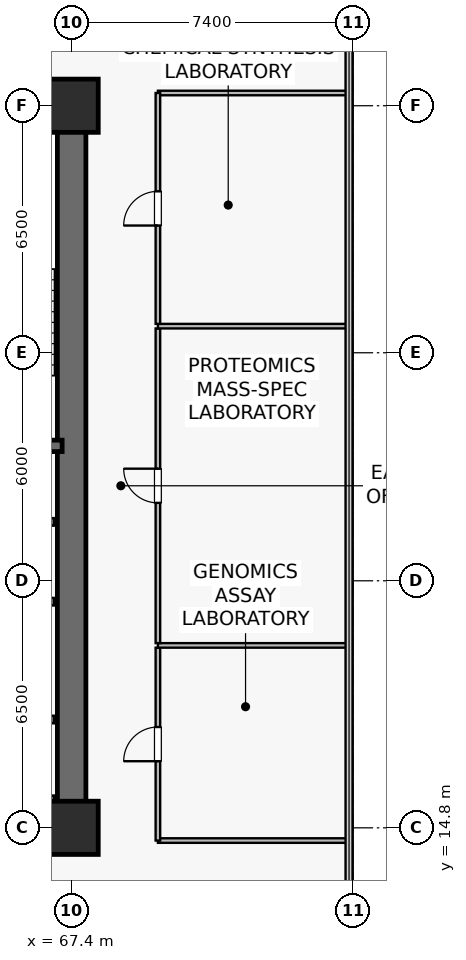
"""IFC4 building model, lengths in metres.
Left out: names, types, materials, properties, quantities, classifications, styles, units other than length and angle.
Written with IfcOpenShell. Run it as: python <this file> out.ifc"""

import sys

from ifc_helpers import new_model, si_unit, direction, frame, frame_2d, origin, origin_2d, place, context, subcontext, project, spatial, rectangle, extrude, source, transform, mapped, element, fill, save


model = new_model("IFC4")
c1 = context("Model", 3, precision=1e-05, world=origin(), true_north=direction((0.0, 1.0)))
c2 = subcontext(c1, "Body", "Model", "MODEL_VIEW")
j1 = project(units=[si_unit("LENGTHUNIT", "METRE"), si_unit("PLANEANGLEUNIT", "RADIAN")], contexts=[c1])
p1 = place(None, origin())
s1 = spatial("IfcSite", under=j1, at=p1, CompositionType="ELEMENT")
p2 = place(p1, origin())
s2 = spatial("IfcBuilding", under=s1, at=p2, CompositionType="ELEMENT")
p3 = place(p2, frame((0.0, 0.0, 41.6)))
s3 = spatial("IfcBuildingStorey", under=s2, at=p3, CompositionType="ELEMENT", Elevation=41.6)
p4 = place(p3, frame((52.225, 14.8, 0.0), z_axis=(0.0, 0.0, 1.0), x_axis=(1.0, 0.0, 0.0)))
e1 = element("IfcWall", 1, at=p4, inside=s3, PredefinedType="SHEAR", context=c2, shape_type="SweptSolid", body=[
    extrude(rectangle(XDim=15.55, YDim=0.75, at=frame_2d((7.775, 0.0))), origin(), (0.0, 0.0, 1.0), 3.78),
])
p5 = place(p3, frame((52.225, 33.8, 0.0), z_axis=(0.0, 0.0, 1.0), x_axis=(1.0, 0.0, 0.0)))
e2 = element("IfcWall", 2, at=p5, inside=s3, PredefinedType="SHEAR", context=c2, shape_type="SweptSolid", body=[
    extrude(rectangle(XDim=15.55, YDim=0.75, at=frame_2d((7.775, 0.0))), origin(), (0.0, 0.0, 1.0), 3.78),
])
p6 = place(p5, frame((7.725, 0.0, 0.0)))
e3 = element("IfcOpeningElement", 3, at=p6, cuts=e2, PredefinedType="OPENING", context=c2, shape_type="SweptSolid", body=[
    extrude(rectangle(XDim=0.95, YDim=2.15, at=frame_2d((0.475, 1.075))), frame((0.0, 0.385, 0.0), z_axis=(0.0, -1.0, 0.0), x_axis=(1.0, 0.0, 0.0)), (0.0, 0.0, 1.0), 0.77),
])
p7 = place(p5, frame((2.66, 0.0, 0.0)))
e4 = element("IfcOpeningElement", 4, at=p7, cuts=e2, PredefinedType="OPENING", context=c2, shape_type="SweptSolid", body=[
    extrude(rectangle(XDim=0.95, YDim=2.15, at=frame_2d((0.475, 1.075))), frame((0.0, 0.385, 0.0), z_axis=(0.0, -1.0, 0.0), x_axis=(1.0, 0.0, 0.0)), (0.0, 0.0, 1.0), 0.77),
])
p8 = place(p3, frame((67.4, 15.175, 0.0), z_axis=(0.0, 0.0, 1.0), x_axis=(0.0, 1.0, 0.0)))
e5 = element("IfcWall", 5, at=p8, inside=s3, PredefinedType="SHEAR", context=c2, shape_type="SweptSolid", body=[
    extrude(rectangle(XDim=18.25, YDim=0.75, at=frame_2d((9.125, 0.0))), origin(), (0.0, 0.0, 1.0), 3.78),
])
p9 = place(p3, frame((63.35, 24.85, 0.0), z_axis=(0.0, 0.0, 1.0), x_axis=(1.0, 0.0, 0.0)))
e6 = element("IfcWall", 6, at=p9, inside=s3, PredefinedType="SHEAR", context=c2, shape_type="SweptSolid", body=[
    extrude(rectangle(XDim=3.8, YDim=0.3, at=frame_2d((1.9, 0.0))), origin(), (0.0, 0.0, 1.0), 3.78),
])
p10 = place(p3, frame((63.35, 33.4, 0.0), z_axis=(0.0, 0.0, 1.0), x_axis=(1.0, 0.0, 0.0)))
e7 = element("IfcWall", 7, at=p10, inside=s3, PredefinedType="SOLIDWALL", context=c2, shape_type="SweptSolid", body=[
    extrude(rectangle(XDim=3.72, YDim=0.12, at=frame_2d((1.86, 0.0))), origin(), (0.0, 0.0, 1.0), 3.78),
])
m1 = source(origin(), c2, "Body", "SweptSolid", [
    extrude(rectangle(XDim=1.4, YDim=1.4, at=origin_2d()), origin(), (0.0, 0.0, 1.0), 4.1),
])
for number, where, z_axis, x_axis in (
    (8, (67.4, 14.8, 0.0), (0.0, 0.0, 1.0), (1.0, 0.0, 0.0)),
    (9, (67.4, 33.8, 0.0), (0.0, 0.0, 1.0), (1.0, 0.0, 0.0)),
):
    element("IfcColumn", number, at=place(p3, frame(where, z_axis=z_axis, x_axis=x_axis)), inside=s3, PredefinedType="COLUMN", context=c2, shape_type="MappedRepresentation", body=[
        mapped(m1, transform((0.0, 0.0, 0.0), scale=1.0)),
    ])
p11 = place(p3, frame((64.67, 17.65, 0.0), z_axis=(0.0, 0.0, 1.0), x_axis=(1.0, 0.0, 0.0)))
e10 = element("IfcWall", 10, at=p11, inside=s3, PredefinedType="SOLIDWALL", context=c2, shape_type="SweptSolid", body=[
    extrude(rectangle(XDim=2.26, YDim=0.2, at=frame_2d((1.13, 0.0))), origin(), (0.0, 0.0, 1.0), 3.78),
])
p12 = place(p11, frame((0.58, 0.0, 0.0)))
e11 = element("IfcOpeningElement", 11, at=p12, cuts=e10, PredefinedType="OPENING", context=c2, shape_type="SweptSolid", body=[
    extrude(rectangle(XDim=1.1, YDim=2.22, at=frame_2d((0.55, 1.11))), frame((0.0, 0.11, 0.0), z_axis=(0.0, -1.0, 0.0), x_axis=(1.0, 0.0, 0.0)), (0.0, 0.0, 1.0), 0.22),
])
for number, where, z_axis, x_axis in (
    (12, (64.67, 15.55, 0.0), (0.0, 0.0, 1.0), (1.0, 0.0, 0.0)),
    (13, (64.67, 20.75, 0.0), (0.0, 0.0, 1.0), (1.0, 0.0, 0.0)),
    (14, (64.67, 22.85, 0.0), (0.0, 0.0, 1.0), (1.0, 0.0, 0.0)),
):
    element("IfcWall", number, at=place(p3, frame(where, z_axis=z_axis, x_axis=x_axis)), inside=s3, PredefinedType="SOLIDWALL", context=c2, shape_type="SweptSolid", body=[
        extrude(rectangle(XDim=2.26, YDim=0.2, at=frame_2d((1.13, 0.0))), origin(), (0.0, 0.0, 1.0), 3.78),
    ])
for number, where, z_axis, x_axis in (
    (15, (69.67, 14.465, 0.0), (0.0, 0.0, 1.0), (1.0, 0.0, 0.0)),
    (16, (69.67, 34.135, 0.0), (0.0, 0.0, 1.0), (1.0, 0.0, 0.0)),
):
    element("IfcWall", number, at=place(p3, frame(where, z_axis=z_axis, x_axis=x_axis)), inside=s3, PredefinedType="PARTITIONING", context=c2, shape_type="SweptSolid", body=[
        extrude(rectangle(XDim=5.02, YDim=0.12, at=frame_2d((2.51, 0.0))), origin(), (0.0, 0.0, 1.0), 3.78),
    ])
p13 = place(p3, frame((69.67, 14.465, 0.0), z_axis=(0.0, 0.0, 1.0), x_axis=(0.0, 1.0, 0.0)))
e17 = element("IfcWall", 17, at=p13, inside=s3, PredefinedType="PARTITIONING", context=c2, shape_type="SweptSolid", body=[
    extrude(rectangle(XDim=5.075, YDim=0.12, at=frame_2d((2.538, 0.0))), origin(), (0.0, 0.0, 1.0), 3.78),
])
p14 = place(p13, frame((2.087, 0.0, 0.0)))
e18 = element("IfcOpeningElement", 18, at=p14, cuts=e17, PredefinedType="OPENING", context=c2, shape_type="SweptSolid", body=[
    extrude(rectangle(XDim=0.9, YDim=2.1, at=frame_2d((0.45, 1.05))), frame((0.0, 0.07, 0.0), z_axis=(0.0, -1.0, 0.0), x_axis=(1.0, 0.0, 0.0)), (0.0, 0.0, 1.0), 0.14),
])
p15 = place(p3, frame((69.67, 19.6, 0.0), z_axis=(0.0, 0.0, 1.0), x_axis=(1.0, 0.0, 0.0)))
e19 = element("IfcWall", 19, at=p15, inside=s3, PredefinedType="PARTITIONING", context=c2, shape_type="SweptSolid", body=[
    extrude(rectangle(XDim=5.02, YDim=0.12, at=frame_2d((2.51, 0.0))), origin(), (0.0, 0.0, 1.0), 3.78),
])
p16 = place(p3, frame((69.67, 19.66, 0.0), z_axis=(0.0, 0.0, 1.0), x_axis=(0.0, 1.0, 0.0)))
e20 = element("IfcWall", 20, at=p16, inside=s3, PredefinedType="PARTITIONING", context=c2, shape_type="SweptSolid", body=[
    extrude(rectangle(XDim=8.28, YDim=0.12, at=frame_2d((4.14, 0.0))), origin(), (0.0, 0.0, 1.0), 3.78),
])
p17 = place(p16, frame((3.69, 0.0, 0.0)))
e21 = element("IfcOpeningElement", 21, at=p17, cuts=e20, PredefinedType="OPENING", context=c2, shape_type="SweptSolid", body=[
    extrude(rectangle(XDim=0.9, YDim=2.1, at=frame_2d((0.45, 1.05))), frame((0.0, 0.07, 0.0), z_axis=(0.0, -1.0, 0.0), x_axis=(1.0, 0.0, 0.0)), (0.0, 0.0, 1.0), 0.14),
])
p18 = place(p3, frame((69.67, 28.0, 0.0), z_axis=(0.0, 0.0, 1.0), x_axis=(1.0, 0.0, 0.0)))
e22 = element("IfcWall", 22, at=p18, inside=s3, PredefinedType="PARTITIONING", context=c2, shape_type="SweptSolid", body=[
    extrude(rectangle(XDim=5.02, YDim=0.12, at=frame_2d((2.51, 0.0))), origin(), (0.0, 0.0, 1.0), 3.78),
])
p19 = place(p3, frame((69.67, 28.06, 0.0), z_axis=(0.0, 0.0, 1.0), x_axis=(0.0, 1.0, 0.0)))
e23 = element("IfcWall", 23, at=p19, inside=s3, PredefinedType="PARTITIONING", context=c2, shape_type="SweptSolid", body=[
    extrude(rectangle(XDim=6.075, YDim=0.12, at=frame_2d((3.038, 0.0))), origin(), (0.0, 0.0, 1.0), 3.78),
])
p20 = place(p19, frame((2.587, 0.0, 0.0)))
e24 = element("IfcOpeningElement", 24, at=p20, cuts=e23, PredefinedType="OPENING", context=c2, shape_type="SweptSolid", body=[
    extrude(rectangle(XDim=0.9, YDim=2.1, at=frame_2d((0.45, 1.05))), frame((0.0, 0.07, 0.0), z_axis=(0.0, -1.0, 0.0), x_axis=(1.0, 0.0, 0.0)), (0.0, 0.0, 1.0), 0.14),
])
m2 = source(origin(), c2, "Body", "SweptSolid", [
    extrude(rectangle(XDim=0.9, YDim=2.1, at=frame_2d((0.45, 1.05))), frame((0.0, 0.025, 0.0), z_axis=(0.0, -1.0, 0.0), x_axis=(1.0, 0.0, 0.0)), (0.0, 0.0, 1.0), 0.05),
])
p21 = place(p14, origin())
e25 = element("IfcDoor", 25, at=p21, inside=s3, OperationType="SINGLE_SWING_LEFT", PredefinedType="DOOR", context=c2, shape_type="MappedRepresentation", body=[
    mapped(m2, transform((0.0, 0.0, 0.0), scale=1.0)),
])
fill(e18, e25)
p22 = place(p17, origin())
e26 = element("IfcDoor", 26, at=p22, inside=s3, OperationType="SINGLE_SWING_RIGHT", PredefinedType="DOOR", context=c2, shape_type="MappedRepresentation", body=[
    mapped(m2, transform((0.0, 0.0, 0.0), scale=1.0)),
])
fill(e21, e26)
p23 = place(p20, origin())
e27 = element("IfcDoor", 27, at=p23, inside=s3, OperationType="SINGLE_SWING_LEFT", PredefinedType="DOOR", context=c2, shape_type="MappedRepresentation", body=[
    mapped(m2, transform((0.0, 0.0, 0.0), scale=1.0)),
])
fill(e24, e27)
save(model, sys.argv[1])
